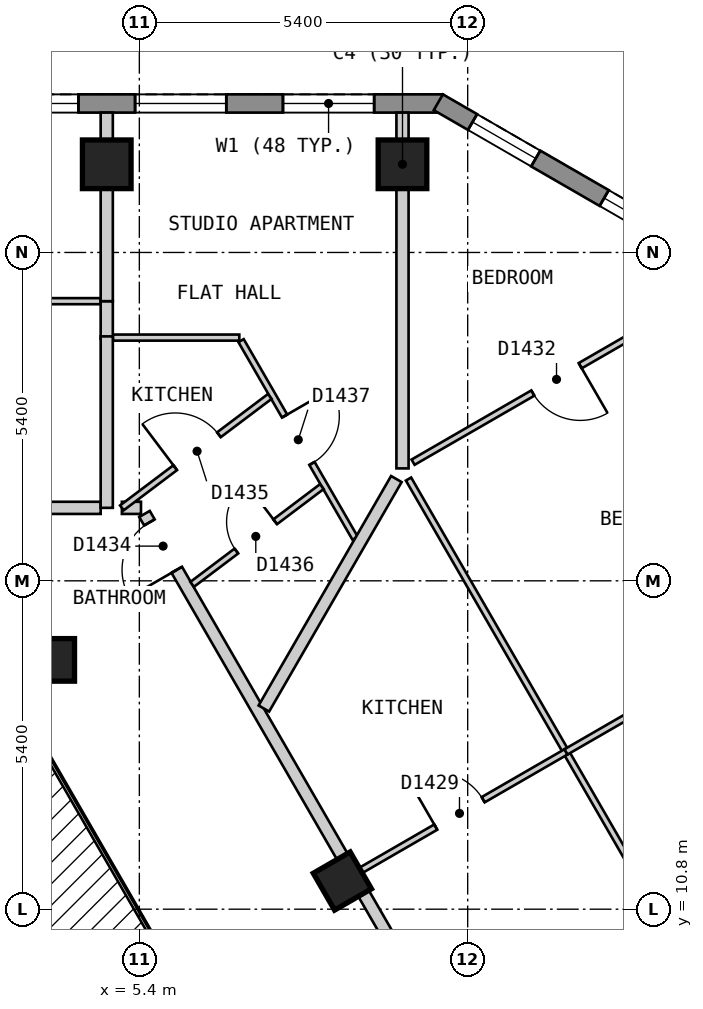
"""IFC4 building model, lengths in metres.
Left out: names, types, materials, properties, quantities, classifications, styles, units other than length and angle.
Written with IfcOpenShell. Run it as: python <this file> out.ifc"""

import sys

from ifc_helpers import new_model, si_unit, direction, frame, frame_2d, origin, origin_2d, place, context, subcontext, project, spatial, polyline, rectangle, outline, extrude, element, fill, save


model = new_model("IFC4")
c1 = context("Model", 3, precision=1e-05, world=origin(), true_north=direction((0.0, 1.0)))
c2 = subcontext(c1, "Body", "Model", "MODEL_VIEW")
j1 = project(units=[si_unit("LENGTHUNIT", "METRE"), si_unit("PLANEANGLEUNIT", "RADIAN")], contexts=[c1])
p1 = place(None, origin())
s1 = spatial("IfcSite", under=j1, at=p1, CompositionType="ELEMENT")
p2 = place(p1, origin())
s2 = spatial("IfcBuilding", under=s1, at=p2, CompositionType="ELEMENT")
p3 = place(p2, frame((0.0, 0.0, 172.2)))
s3 = spatial("IfcBuildingStorey", under=s2, at=p3, CompositionType="ELEMENT", Elevation=172.2)
for number, where, z_axis, x_axis in (
    (1, (9.728, 23.05, 0.0), (0.0, 0.0, 1.0), (-1.0, 0.0, 0.0)),
    (2, (4.864, 23.05, 0.0), (0.0, 0.0, 1.0), (-1.0, 0.0, 0.0)),
):
    element("IfcColumn", number, at=place(p3, frame(where, z_axis=z_axis, x_axis=x_axis)), inside=s3, PredefinedType="COLUMN", context=c2, shape_type="SweptSolid", body=[
        extrude(rectangle(XDim=0.8, YDim=0.8, at=origin_2d()), origin(), (0.0, 0.0, 1.0), 3.0),
    ])
for number, where, z_axis, x_axis in (
    (3, (8.739, 11.263, 0.0), (0.0, 0.0, 1.0), (-0.5, 0.866, 0.0)),
    (4, (3.984, 14.9, 0.0), (0.0, 0.0, 1.0), (1.0, 0.0, 0.0)),
):
    element("IfcColumn", number, at=place(p3, frame(where, z_axis=z_axis, x_axis=x_axis)), inside=s3, PredefinedType="COLUMN", context=c2, shape_type="SweptSolid", body=[
        extrude(rectangle(XDim=0.7, YDim=0.7, at=origin_2d()), origin(), (0.0, 0.0, 1.0), 3.0),
    ])
p4 = place(p3, frame((10.392, 24.05, 0.0), z_axis=(0.0, 0.0, 1.0), x_axis=(-1.0, 0.0, 0.0)))
e5 = element("IfcWall", 5, at=p4, inside=s3, PredefinedType="SOLIDWALL", context=c2, shape_type="SweptSolid", body=[
    extrude(outline(polyline([(0.0, -0.15), (20.784, -0.15), (20.704, 0.15), (0.08, 0.15), (0.0, -0.15)])), origin(), (0.0, 0.0, 1.0), 2.7),
])
p5 = place(p4, frame((1.13, 0.0, 0.15)))
e6 = element("IfcOpeningElement", 6, at=p5, cuts=e5, PredefinedType="OPENING", context=c2, shape_type="SweptSolid", body=[
    extrude(rectangle(XDim=1.5, YDim=2.1, at=frame_2d((0.75, 1.05))), frame((0.0, 0.16, 0.0), z_axis=(0.0, -1.0, 0.0), x_axis=(1.0, 0.0, 0.0)), (0.0, 0.0, 1.0), 0.32),
])
p6 = place(p4, frame((3.562, 0.0, 0.15)))
e7 = element("IfcOpeningElement", 7, at=p6, cuts=e5, PredefinedType="OPENING", context=c2, shape_type="SweptSolid", body=[
    extrude(rectangle(XDim=1.5, YDim=2.1, at=frame_2d((0.75, 1.05))), frame((0.0, 0.16, 0.0), z_axis=(0.0, -1.0, 0.0), x_axis=(1.0, 0.0, 0.0)), (0.0, 0.0, 1.0), 0.32),
])
p7 = place(p4, frame((5.994, 0.0, 0.15)))
e8 = element("IfcOpeningElement", 8, at=p7, cuts=e5, PredefinedType="OPENING", context=c2, shape_type="SweptSolid", body=[
    extrude(rectangle(XDim=1.5, YDim=2.1, at=frame_2d((0.75, 1.05))), frame((0.0, 0.16, 0.0), z_axis=(0.0, -1.0, 0.0), x_axis=(1.0, 0.0, 0.0)), (0.0, 0.0, 1.0), 0.32),
])
p8 = place(p4, frame((8.426, 0.0, 0.15)))
e9 = element("IfcOpeningElement", 9, at=p8, cuts=e5, PredefinedType="OPENING", context=c2, shape_type="SweptSolid", body=[
    extrude(rectangle(XDim=1.5, YDim=2.1, at=frame_2d((0.75, 1.05))), frame((0.0, 0.16, 0.0), z_axis=(0.0, -1.0, 0.0), x_axis=(1.0, 0.0, 0.0)), (0.0, 0.0, 1.0), 0.32),
])
p9 = place(p4, frame((10.858, 0.0, 0.15)))
e10 = element("IfcOpeningElement", 10, at=p9, cuts=e5, PredefinedType="OPENING", context=c2, shape_type="SweptSolid", body=[
    extrude(rectangle(XDim=1.5, YDim=2.1, at=frame_2d((0.75, 1.05))), frame((0.0, 0.16, 0.0), z_axis=(0.0, -1.0, 0.0), x_axis=(1.0, 0.0, 0.0)), (0.0, 0.0, 1.0), 0.32),
])
p10 = place(p4, frame((13.29, 0.0, 0.15)))
e11 = element("IfcOpeningElement", 11, at=p10, cuts=e5, PredefinedType="OPENING", context=c2, shape_type="SweptSolid", body=[
    extrude(rectangle(XDim=1.5, YDim=2.1, at=frame_2d((0.75, 1.05))), frame((0.0, 0.16, 0.0), z_axis=(0.0, -1.0, 0.0), x_axis=(1.0, 0.0, 0.0)), (0.0, 0.0, 1.0), 0.32),
])
p11 = place(p4, frame((15.722, 0.0, 0.15)))
e12 = element("IfcOpeningElement", 12, at=p11, cuts=e5, PredefinedType="OPENING", context=c2, shape_type="SweptSolid", body=[
    extrude(rectangle(XDim=1.5, YDim=2.1, at=frame_2d((0.75, 1.05))), frame((0.0, 0.16, 0.0), z_axis=(0.0, -1.0, 0.0), x_axis=(1.0, 0.0, 0.0)), (0.0, 0.0, 1.0), 0.32),
])
p12 = place(p4, frame((18.154, 0.0, 0.15)))
e13 = element("IfcOpeningElement", 13, at=p12, cuts=e5, PredefinedType="OPENING", context=c2, shape_type="SweptSolid", body=[
    extrude(rectangle(XDim=1.5, YDim=2.1, at=frame_2d((0.75, 1.05))), frame((0.0, 0.16, 0.0), z_axis=(0.0, -1.0, 0.0), x_axis=(1.0, 0.0, 0.0)), (0.0, 0.0, 1.0), 0.32),
])
p13 = place(p3, frame((14.647, 21.57, 0.0), z_axis=(0.0, 0.0, 1.0), x_axis=(-0.866022959057, 0.500004234368, 0.0)))
e14 = element("IfcWall", 14, at=p13, inside=s3, PredefinedType="SOLIDWALL", context=c2, shape_type="SweptSolid", body=[
    extrude(outline(polyline([(0.0, -0.15), (5.0, -0.15), (4.92, 0.15), (0.08, 0.15), (0.0, -0.15)])), origin(), (0.0, 0.0, 1.0), 2.7),
])
p14 = place(p13, frame((0.65, 0.0, 0.15)))
e15 = element("IfcOpeningElement", 15, at=p14, cuts=e14, PredefinedType="OPENING", context=c2, shape_type="SweptSolid", body=[
    extrude(rectangle(XDim=1.2, YDim=2.1, at=frame_2d((0.6, 1.05))), frame((0.0, 0.16, 0.0), z_axis=(0.0, -1.0, 0.0), x_axis=(1.0, 0.0, 0.0)), (0.0, 0.0, 1.0), 0.32),
])
p15 = place(p13, frame((3.15, 0.0, 0.15)))
e16 = element("IfcOpeningElement", 16, at=p15, cuts=e14, PredefinedType="OPENING", context=c2, shape_type="SweptSolid", body=[
    extrude(rectangle(XDim=1.2, YDim=2.1, at=frame_2d((0.6, 1.05))), frame((0.0, 0.16, 0.0), z_axis=(0.0, -1.0, 0.0), x_axis=(1.0, 0.0, 0.0)), (0.0, 0.0, 1.0), 0.32),
])
p16 = place(p3, frame((5.485, 17.3, 0.0), z_axis=(0.0, 0.0, 1.0), x_axis=(0.499965832213, -0.866045129667, 0.0)))
e17 = element("IfcWall", 17, at=p16, inside=s3, PredefinedType="PARTITIONING", context=c2, shape_type="SweptSolid", body=[
    extrude(rectangle(XDim=10.739, YDim=0.2, at=frame_2d((5.369, 0.0))), origin(), (0.0, 0.0, 1.0), 2.7),
])
p17 = place(p16, frame((9.048, 0.0, 0.0)))
e18 = element("IfcOpeningElement", 18, at=p17, cuts=e17, PredefinedType="OPENING", context=c2, shape_type="SweptSolid", body=[
    extrude(rectangle(XDim=1.0, YDim=2.1, at=frame_2d((0.5, 1.05))), frame((0.0, 0.11, 0.0), z_axis=(0.0, -1.0, 0.0), x_axis=(1.0, 0.0, 0.0)), (0.0, 0.0, 1.0), 0.22),
])
p18 = place(p16, frame((0.161, 0.0, 0.0)))
e19 = element("IfcOpeningElement", 19, at=p18, cuts=e17, PredefinedType="OPENING", context=c2, shape_type="SweptSolid", body=[
    extrude(rectangle(XDim=0.9, YDim=2.1, at=frame_2d((0.45, 1.05))), frame((0.0, 0.11, 0.0), z_axis=(0.0, -1.0, 0.0), x_axis=(1.0, 0.0, 0.0)), (0.0, 0.0, 1.0), 0.22),
])
p19 = place(p3, frame((-5.311, 17.4, 0.0), z_axis=(0.0, 0.0, 1.0), x_axis=(1.0, 0.0, 0.0)))
e20 = element("IfcWall", 20, at=p19, inside=s3, PredefinedType="PARTITIONING", context=c2, shape_type="SweptSolid", body=[
    extrude(rectangle(XDim=10.075, YDim=0.2, at=frame_2d((5.038, 0.0))), origin(), (0.0, 0.0, 1.0), 2.7),
])
p20 = place(p19, frame((2.429, 0.0, 0.0)))
e21 = element("IfcOpeningElement", 21, at=p20, cuts=e20, PredefinedType="OPENING", context=c2, shape_type="SweptSolid", body=[
    extrude(rectangle(XDim=0.9, YDim=2.1, at=frame_2d((0.45, 1.05))), frame((0.0, 0.11, 0.0), z_axis=(0.0, -1.0, 0.0), x_axis=(1.0, 0.0, 0.0)), (0.0, 0.0, 1.0), 0.22),
])
p21 = place(p3, frame((5.113, 17.4, 0.0), z_axis=(0.0, 0.0, 1.0), x_axis=(1.0, 0.0, 0.0)))
e22 = element("IfcWall", 22, at=p21, inside=s3, PredefinedType="PARTITIONING", context=c2, shape_type="SweptSolid", body=[
    extrude(rectangle(XDim=0.314, YDim=0.2, at=frame_2d((0.157, 0.0))), origin(), (0.0, 0.0, 1.0), 2.7),
])
p22 = place(p3, frame((7.073, 20.15, 0.0), z_axis=(0.0, 0.0, 1.0), x_axis=(0.499917691695, -0.866072919292, 0.0)))
e23 = element("IfcWall", 23, at=p22, inside=s3, PredefinedType="PARTITIONING", context=c2, shape_type="SweptSolid", body=[
    extrude(rectangle(XDim=3.753, YDim=0.1, at=frame_2d((1.876, 0.0))), origin(), (0.0, 0.0, 1.0), 2.7),
])
p23 = place(p22, frame((1.432, 0.0, 0.0)))
e24 = element("IfcOpeningElement", 24, at=p23, cuts=e23, PredefinedType="OPENING", context=c2, shape_type="SweptSolid", body=[
    extrude(rectangle(XDim=0.9, YDim=2.1, at=frame_2d((0.45, 1.05))), frame((0.0, 0.06, 0.0), z_axis=(0.0, -1.0, 0.0), x_axis=(1.0, 0.0, 0.0)), (0.0, 0.0, 1.0), 0.12),
])
p24 = place(p3, frame((9.827, 17.874, 0.0), z_axis=(0.0, 0.0, 1.0), x_axis=(0.499962189394, -0.866047232647, 0.0)))
e25 = element("IfcWall", 25, at=p24, inside=s3, PredefinedType="PARTITIONING", context=c2, shape_type="SweptSolid", body=[
    extrude(rectangle(XDim=11.401, YDim=0.1, at=frame_2d((5.701, 0.0))), origin(), (0.0, 0.0, 1.0), 2.7),
])
p25 = place(p24, frame((7.433, 0.0, 0.0)))
e26 = element("IfcOpeningElement", 26, at=p25, cuts=e25, PredefinedType="OPENING", context=c2, shape_type="SweptSolid", body=[
    extrude(rectangle(XDim=0.9, YDim=2.1, at=frame_2d((0.45, 1.05))), frame((0.0, 0.06, 0.0), z_axis=(0.0, -1.0, 0.0), x_axis=(1.0, 0.0, 0.0)), (0.0, 0.0, 1.0), 0.12),
])
p26 = place(p3, frame((4.964, 20.2, 0.0), z_axis=(0.0, 0.0, 1.0), x_axis=(1.0, 0.0, 0.0)))
e27 = element("IfcWall", 27, at=p26, inside=s3, PredefinedType="PARTITIONING", context=c2, shape_type="SweptSolid", body=[
    extrude(rectangle(XDim=2.08, YDim=0.1, at=frame_2d((1.04, 0.0))), origin(), (0.0, 0.0, 1.0), 2.7),
])
p27 = place(p3, frame((0.05, 20.799, 0.0), z_axis=(0.0, 0.0, 1.0), x_axis=(1.0, 0.0, 0.0)))
e28 = element("IfcWall", 28, at=p27, inside=s3, PredefinedType="PARTITIONING", context=c2, shape_type="SweptSolid", body=[
    extrude(rectangle(XDim=4.714, YDim=0.1, at=frame_2d((2.357, 0.0))), origin(), (0.0, 0.0, 1.0), 2.7),
])
p28 = place(p27, frame((1.982, 0.0, 0.0)))
e29 = element("IfcOpeningElement", 29, at=p28, cuts=e28, PredefinedType="OPENING", context=c2, shape_type="SweptSolid", body=[
    extrude(rectangle(XDim=0.8, YDim=2.1, at=frame_2d((0.4, 1.05))), frame((0.0, 0.06, 0.0), z_axis=(0.0, -1.0, 0.0), x_axis=(1.0, 0.0, 0.0)), (0.0, 0.0, 1.0), 0.12),
])
p29 = place(p3, frame((8.999, 11.413, 0.0), z_axis=(0.0, 0.0, 1.0), x_axis=(0.865969252911, 0.500097243556, 0.0)))
e30 = element("IfcWall", 30, at=p29, inside=s3, PredefinedType="PARTITIONING", context=c2, shape_type="SweptSolid", body=[
    extrude(rectangle(XDim=3.947, YDim=0.1, at=frame_2d((1.974, 0.0))), origin(), (0.0, 0.0, 1.0), 2.7),
])
p30 = place(p29, frame((1.474, 0.0, 0.0)))
e31 = element("IfcOpeningElement", 31, at=p30, cuts=e30, PredefinedType="OPENING", context=c2, shape_type="SweptSolid", body=[
    extrude(rectangle(XDim=0.9, YDim=2.1, at=frame_2d((0.45, 1.05))), frame((0.0, 0.06, 0.0), z_axis=(0.0, -1.0, 0.0), x_axis=(1.0, 0.0, 0.0)), (0.0, 0.0, 1.0), 0.12),
])
p31 = place(p3, frame((9.902, 18.151, 0.0), z_axis=(0.0, 0.0, 1.0), x_axis=(0.866032278734, 0.499988092049, 0.0)))
e32 = element("IfcWall", 32, at=p31, inside=s3, PredefinedType="PARTITIONING", context=c2, shape_type="SweptSolid", body=[
    extrude(rectangle(XDim=5.649, YDim=0.1, at=frame_2d((2.824, 0.0))), origin(), (0.0, 0.0, 1.0), 2.7),
])
p32 = place(p31, frame((2.274, 0.0, 0.0)))
e33 = element("IfcOpeningElement", 33, at=p32, cuts=e32, PredefinedType="OPENING", context=c2, shape_type="SweptSolid", body=[
    extrude(rectangle(XDim=0.9, YDim=2.1, at=frame_2d((0.45, 1.05))), frame((0.0, 0.06, 0.0), z_axis=(0.0, -1.0, 0.0), x_axis=(1.0, 0.0, 0.0)), (0.0, 0.0, 1.0), 0.12),
])
p33 = place(p3, frame((6.269, 16.142, 0.0), z_axis=(0.0, 0.0, 1.0), x_axis=(0.798549086509, 0.601929693931, 0.0)))
e34 = element("IfcWall", 34, at=p33, inside=s3, PredefinedType="PARTITIONING", context=c2, shape_type="SweptSolid", body=[
    extrude(rectangle(XDim=2.67, YDim=0.1, at=frame_2d((1.335, 0.0))), origin(), (0.0, 0.0, 1.0), 2.7),
])
p34 = place(p33, frame((0.91, 0.0, 0.0)))
e35 = element("IfcOpeningElement", 35, at=p34, cuts=e34, PredefinedType="OPENING", context=c2, shape_type="SweptSolid", body=[
    extrude(rectangle(XDim=0.8, YDim=2.1, at=frame_2d((0.4, 1.05))), frame((0.0, 0.06, 0.0), z_axis=(0.0, -1.0, 0.0), x_axis=(1.0, 0.0, 0.0)), (0.0, 0.0, 1.0), 0.12),
])
p35 = place(p3, frame((5.113, 17.4, 0.0), z_axis=(0.0, 0.0, 1.0), x_axis=(0.798718434647, 0.601704962714, 0.0)))
e36 = element("IfcWall", 36, at=p35, inside=s3, PredefinedType="PARTITIONING", context=c2, shape_type="SweptSolid", body=[
    extrude(rectangle(XDim=3.045, YDim=0.1, at=frame_2d((1.522, 0.0))), origin(), (0.0, 0.0, 1.0), 2.7),
])
p36 = place(p35, frame((1.098, 0.0, 0.0)))
e37 = element("IfcOpeningElement", 37, at=p36, cuts=e36, PredefinedType="OPENING", context=c2, shape_type="SweptSolid", body=[
    extrude(rectangle(XDim=0.9, YDim=2.1, at=frame_2d((0.45, 1.05))), frame((0.0, 0.06, 0.0), z_axis=(0.0, -1.0, 0.0), x_axis=(1.0, 0.0, 0.0)), (0.0, 0.0, 1.0), 0.12),
])
p37 = place(p3, frame((4.864, 20.799, 0.0), z_axis=(0.0, 0.0, 1.0), x_axis=(0.0, -1.0, 0.0)))
e38 = element("IfcWall", 38, at=p37, inside=s3, PredefinedType="PARTITIONING", context=c2, shape_type="SweptSolid", body=[
    extrude(rectangle(XDim=0.619, YDim=0.2, at=frame_2d((0.31, 0.0))), origin(), (0.0, 0.0, 1.0), 2.7),
])
p38 = place(p3, frame((7.448, 14.1, 0.0), z_axis=(0.0, 0.0, 1.0), x_axis=(0.500013426303, 0.866017651966, 0.0)))
e39 = element("IfcWall", 39, at=p38, inside=s3, PredefinedType="PARTITIONING", context=c2, shape_type="SweptSolid", body=[
    extrude(rectangle(XDim=4.358, YDim=0.2, at=frame_2d((2.179, 0.0))), origin(), (0.0, 0.0, 1.0), 2.7),
])
p39 = place(p3, frame((4.864, 17.4, 0.0), z_axis=(0.0, 0.0, 1.0), x_axis=(0.0, 1.0, 0.0)))
e40 = element("IfcWall", 40, at=p39, inside=s3, PredefinedType="PARTITIONING", context=c2, shape_type="SweptSolid", body=[
    extrude(rectangle(XDim=2.82, YDim=0.2, at=frame_2d((1.41, 0.0))), origin(), (0.0, 0.0, 1.0), 2.7),
])
p40 = place(p3, frame((4.864, 20.799, 0.0), z_axis=(0.0, 0.0, 1.0), x_axis=(0.0, 1.0, 0.0)))
e41 = element("IfcWall", 41, at=p40, inside=s3, PredefinedType="PARTITIONING", context=c2, shape_type="SweptSolid", body=[
    extrude(rectangle(XDim=3.101, YDim=0.2, at=frame_2d((1.55, 0.0))), origin(), (0.0, 0.0, 1.0), 2.7),
])
p41 = place(p3, frame((9.728, 18.049, 0.0), z_axis=(0.0, 0.0, 1.0), x_axis=(0.0, 1.0, 0.0)))
e42 = element("IfcWall", 42, at=p41, inside=s3, PredefinedType="PARTITIONING", context=c2, shape_type="SweptSolid", body=[
    extrude(rectangle(XDim=5.851, YDim=0.2, at=frame_2d((2.925, 0.0))), origin(), (0.0, 0.0, 1.0), 2.7),
])
p42 = place(p3, frame((12.417, 13.387, 0.0), z_axis=(0.0, 0.0, 1.0), x_axis=(0.866070981966, 0.499921047963, 0.0)))
e43 = element("IfcWall", 43, at=p42, inside=s3, PredefinedType="PARTITIONING", context=c2, shape_type="SweptSolid", body=[
    extrude(rectangle(XDim=5.853, YDim=0.1, at=frame_2d((2.927, 0.0))), origin(), (0.0, 0.0, 1.0), 2.7),
])
p43 = place(p42, frame((2.476, 0.0, 0.0)))
e44 = element("IfcOpeningElement", 44, at=p43, cuts=e43, PredefinedType="OPENING", context=c2, shape_type="SweptSolid", body=[
    extrude(rectangle(XDim=0.9, YDim=2.1, at=frame_2d((0.45, 1.05))), frame((0.0, 0.06, 0.0), z_axis=(0.0, -1.0, 0.0), x_axis=(1.0, 0.0, 0.0)), (0.0, 0.0, 1.0), 0.12),
])
p44 = place(p5, origin())
e45 = element("IfcWindow", 45, at=p44, inside=s3, PartitioningType="SINGLE_PANEL", PredefinedType="WINDOW", context=c2, shape_type="SweptSolid", body=[
    extrude(rectangle(XDim=1.5, YDim=2.1, at=frame_2d((0.75, 1.05))), frame((0.0, 0.03, 0.0), z_axis=(0.0, -1.0, 0.0), x_axis=(1.0, 0.0, 0.0)), (0.0, 0.0, 1.0), 0.06),
])
fill(e6, e45)
p45 = place(p6, origin())
e46 = element("IfcWindow", 46, at=p45, inside=s3, PartitioningType="SINGLE_PANEL", PredefinedType="WINDOW", context=c2, shape_type="SweptSolid", body=[
    extrude(rectangle(XDim=1.5, YDim=2.1, at=frame_2d((0.75, 1.05))), frame((0.0, 0.03, 0.0), z_axis=(0.0, -1.0, 0.0), x_axis=(1.0, 0.0, 0.0)), (0.0, 0.0, 1.0), 0.06),
])
fill(e7, e46)
p46 = place(p7, origin())
e47 = element("IfcWindow", 47, at=p46, inside=s3, PartitioningType="SINGLE_PANEL", PredefinedType="WINDOW", context=c2, shape_type="SweptSolid", body=[
    extrude(rectangle(XDim=1.5, YDim=2.1, at=frame_2d((0.75, 1.05))), frame((0.0, 0.03, 0.0), z_axis=(0.0, -1.0, 0.0), x_axis=(1.0, 0.0, 0.0)), (0.0, 0.0, 1.0), 0.06),
])
fill(e8, e47)
p47 = place(p14, origin())
e48 = element("IfcWindow", 48, at=p47, inside=s3, PartitioningType="SINGLE_PANEL", PredefinedType="WINDOW", context=c2, shape_type="SweptSolid", body=[
    extrude(rectangle(XDim=1.2, YDim=2.1, at=frame_2d((0.6, 1.05))), frame((0.0, 0.03, 0.0), z_axis=(0.0, -1.0, 0.0), x_axis=(1.0, 0.0, 0.0)), (0.0, 0.0, 1.0), 0.06),
])
fill(e15, e48)
p48 = place(p15, origin())
e49 = element("IfcWindow", 49, at=p48, inside=s3, PartitioningType="SINGLE_PANEL", PredefinedType="WINDOW", context=c2, shape_type="SweptSolid", body=[
    extrude(rectangle(XDim=1.2, YDim=2.1, at=frame_2d((0.6, 1.05))), frame((0.0, 0.03, 0.0), z_axis=(0.0, -1.0, 0.0), x_axis=(1.0, 0.0, 0.0)), (0.0, 0.0, 1.0), 0.06),
])
fill(e16, e49)
p49 = place(p30, origin())
e50 = element("IfcDoor", 50, at=p49, inside=s3, OperationType="SINGLE_SWING_LEFT", PredefinedType="DOOR", context=c2, shape_type="SweptSolid", body=[
    extrude(rectangle(XDim=0.9, YDim=2.1, at=frame_2d((0.45, 1.05))), frame((0.0, 0.025, 0.0), z_axis=(0.0, -1.0, 0.0), x_axis=(1.0, 0.0, 0.0)), (0.0, 0.0, 1.0), 0.05),
])
fill(e31, e50)
p50 = place(p32, origin())
e51 = element("IfcDoor", 51, at=p50, inside=s3, OperationType="SINGLE_SWING_RIGHT", PredefinedType="DOOR", context=c2, shape_type="SweptSolid", body=[
    extrude(rectangle(XDim=0.9, YDim=2.1, at=frame_2d((0.45, 1.05))), frame((0.0, 0.025, 0.0), z_axis=(0.0, -1.0, 0.0), x_axis=(1.0, 0.0, 0.0)), (0.0, 0.0, 1.0), 0.05),
])
fill(e33, e51)
p51 = place(p18, origin())
e52 = element("IfcDoor", 52, at=p51, inside=s3, OperationType="SINGLE_SWING_RIGHT", PredefinedType="DOOR", context=c2, shape_type="SweptSolid", body=[
    extrude(rectangle(XDim=0.9, YDim=2.1, at=frame_2d((0.45, 1.05))), frame((0.0, 0.025, 0.0), z_axis=(0.0, -1.0, 0.0), x_axis=(1.0, 0.0, 0.0)), (0.0, 0.0, 1.0), 0.05),
])
fill(e19, e52)
p52 = place(p36, origin())
e53 = element("IfcDoor", 53, at=p52, inside=s3, OperationType="SINGLE_SWING_LEFT", PredefinedType="DOOR", context=c2, shape_type="SweptSolid", body=[
    extrude(rectangle(XDim=0.9, YDim=2.1, at=frame_2d((0.45, 1.05))), frame((0.0, 0.025, 0.0), z_axis=(0.0, -1.0, 0.0), x_axis=(1.0, 0.0, 0.0)), (0.0, 0.0, 1.0), 0.05),
])
fill(e37, e53)
p53 = place(p34, origin())
e54 = element("IfcDoor", 54, at=p53, inside=s3, OperationType="SINGLE_SWING_RIGHT", PredefinedType="DOOR", context=c2, shape_type="SweptSolid", body=[
    extrude(rectangle(XDim=0.8, YDim=2.1, at=frame_2d((0.4, 1.05))), frame((0.0, 0.025, 0.0), z_axis=(0.0, -1.0, 0.0), x_axis=(1.0, 0.0, 0.0)), (0.0, 0.0, 1.0), 0.05),
])
fill(e35, e54)
p54 = place(p23, origin())
e55 = element("IfcDoor", 55, at=p54, inside=s3, OperationType="SINGLE_SWING_LEFT", PredefinedType="DOOR", context=c2, shape_type="SweptSolid", body=[
    extrude(rectangle(XDim=0.9, YDim=2.1, at=frame_2d((0.45, 1.05))), frame((0.0, 0.025, 0.0), z_axis=(0.0, -1.0, 0.0), x_axis=(1.0, 0.0, 0.0)), (0.0, 0.0, 1.0), 0.05),
])
fill(e24, e55)
save(model, sys.argv[1])
